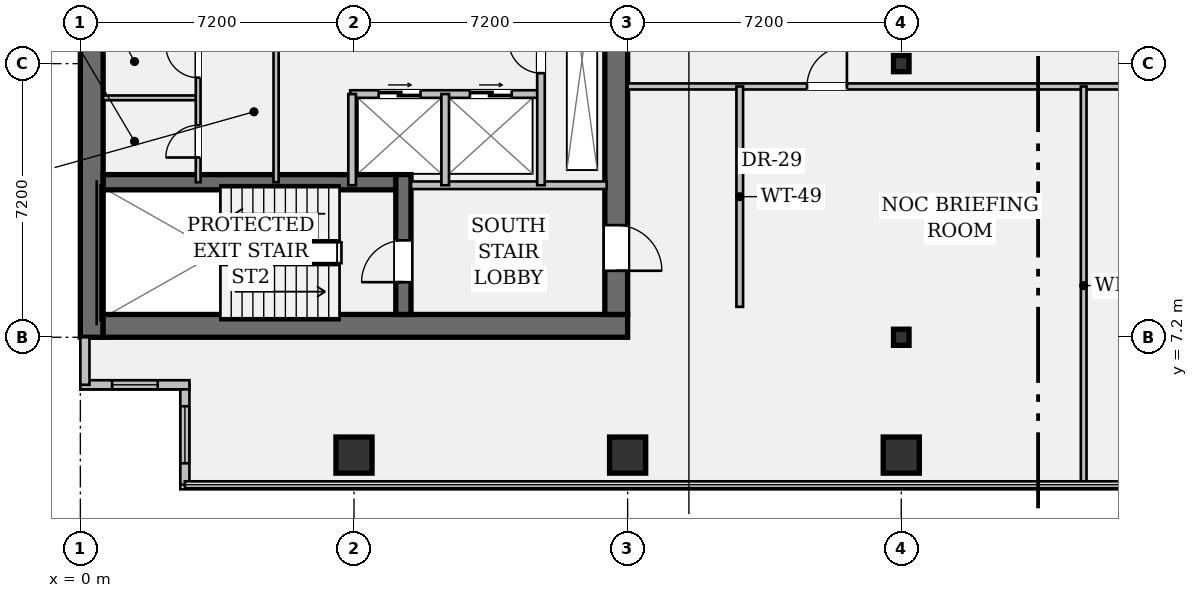
"""IFC4 building model, lengths in metres.
Left out: names, types, materials, properties, quantities, classifications, styles, units other than length and angle.
Written with IfcOpenShell. Run it as: python <this file> out.ifc"""

import sys

from ifc_helpers import new_model, si_unit, direction, frame, frame_2d, origin, origin_2d, place, context, subcontext, project, spatial, rectangle, hollow_rectangle, i_section, extrude, element, fill, save


model = new_model("IFC4")
c1 = context("Model", 3, precision=1e-05, world=origin(), true_north=direction((0.0, 1.0)))
c2 = subcontext(c1, "Body", "Model", "MODEL_VIEW")
j1 = project(units=[si_unit("LENGTHUNIT", "METRE"), si_unit("PLANEANGLEUNIT", "RADIAN")], contexts=[c1])
p1 = place(None, origin())
s1 = spatial("IfcSite", under=j1, at=p1, CompositionType="ELEMENT")
p2 = place(p1, origin())
s2 = spatial("IfcBuilding", under=s1, at=p2, CompositionType="ELEMENT")
p3 = place(p2, frame((0.0, 0.0, 97.65)))
s3 = spatial("IfcBuildingStorey", under=s2, at=p3, CompositionType="ELEMENT", Elevation=97.65)
p4 = place(p3, frame((0.3, 7.2, 0.0), z_axis=(0.0, 0.0, 1.0), x_axis=(0.0, 1.0, 0.0)))
e1 = element("IfcWall", 1, at=p4, inside=s3, PredefinedType="SHEAR", context=c2, shape_type="SweptSolid", body=[
    extrude(rectangle(XDim=28.8, YDim=0.6, at=frame_2d((14.4, 0.0))), origin(), (0.0, 0.0, 1.0), 4.28),
])
p5 = place(p3, frame((0.6, 7.5, 0.0), z_axis=(0.0, 0.0, 1.0), x_axis=(1.0, 0.0, 0.0)))
e2 = element("IfcWall", 2, at=p5, inside=s3, PredefinedType="SHEAR", context=c2, shape_type="SweptSolid", body=[
    extrude(rectangle(XDim=13.8, YDim=0.6, at=frame_2d((6.9, 0.0))), origin(), (0.0, 0.0, 1.0), 4.28),
])
p6 = place(p3, frame((14.1, 35.4, 0.0), z_axis=(0.0, 0.0, 1.0), x_axis=(0.0, -1.0, 0.0)))
e3 = element("IfcWall", 3, at=p6, inside=s3, PredefinedType="SHEAR", context=c2, shape_type="SweptSolid", body=[
    extrude(rectangle(XDim=27.6, YDim=0.6, at=frame_2d((13.8, 0.0))), origin(), (0.0, 0.0, 1.0), 4.28),
])
p7 = place(p6, frame((1.3, 0.0, 0.0)))
e4 = element("IfcOpeningElement", 4, at=p7, cuts=e3, PredefinedType="OPENING", context=c2, shape_type="SweptSolid", body=[
    extrude(rectangle(XDim=1.2, YDim=2.15, at=frame_2d((0.6, 1.075))), frame((0.0, 0.312, 0.0), z_axis=(0.0, -1.0, 0.0), x_axis=(1.0, 0.0, 0.0)), (0.0, 0.0, 1.0), 0.624),
])
p8 = place(p6, frame((25.25, 0.0, 0.0)))
e5 = element("IfcOpeningElement", 5, at=p8, cuts=e3, PredefinedType="OPENING", context=c2, shape_type="SweptSolid", body=[
    extrude(rectangle(XDim=1.2, YDim=2.15, at=frame_2d((0.6, 1.075))), frame((0.0, 0.312, 0.0), z_axis=(0.0, -1.0, 0.0), x_axis=(1.0, 0.0, 0.0)), (0.0, 0.0, 1.0), 0.624),
])
p9 = place(p6, frame((14.6, 0.0, 0.0)))
e6 = element("IfcOpeningElement", 6, at=p9, cuts=e3, PredefinedType="OPENING", context=c2, shape_type="SweptSolid", body=[
    extrude(rectangle(XDim=1.6, YDim=2.2, at=frame_2d((0.8, 1.1))), frame((0.0, 0.312, 0.0), z_axis=(0.0, -1.0, 0.0), x_axis=(1.0, 0.0, 0.0)), (0.0, 0.0, 1.0), 0.624),
])
p10 = place(p3, frame((0.6, 11.28, 0.0), z_axis=(0.0, 0.0, 1.0), x_axis=(1.0, 0.0, 0.0)))
e7 = element("IfcWall", 7, at=p10, inside=s3, PredefinedType="SHEAR", context=c2, shape_type="SweptSolid", body=[
    extrude(rectangle(XDim=7.7, YDim=0.4, at=frame_2d((3.85, 0.0))), origin(), (0.0, 0.0, 1.0), 4.28),
])
p11 = place(p3, frame((8.5, 7.8, 0.0), z_axis=(0.0, 0.0, 1.0), x_axis=(0.0, 1.0, 0.0)))
e8 = element("IfcWall", 8, at=p11, inside=s3, PredefinedType="SHEAR", context=c2, shape_type="SweptSolid", body=[
    extrude(rectangle(XDim=3.68, YDim=0.4, at=frame_2d((1.84, 0.0))), origin(), (0.0, 0.0, 1.0), 4.28),
])
p12 = place(p11, frame((0.85, 0.0, 0.0)))
e9 = element("IfcOpeningElement", 9, at=p12, cuts=e8, PredefinedType="OPENING", context=c2, shape_type="SweptSolid", body=[
    extrude(rectangle(XDim=1.1, YDim=2.15, at=frame_2d((0.55, 1.075))), frame((0.0, 0.212, 0.0), z_axis=(0.0, -1.0, 0.0), x_axis=(1.0, 0.0, 0.0)), (0.0, 0.0, 1.0), 0.424),
])
for number, where, z_axis, x_axis in (
    (10, (7.2, 4.1, 0.0), (0.0, 0.0, 1.0), (1.0, 0.0, 0.0)),
    (11, (14.4, 4.1, 0.0), (0.0, 0.0, 1.0), (1.0, 0.0, 0.0)),
    (12, (21.6, 4.1, 0.0), (0.0, 0.0, 1.0), (1.0, 0.0, 0.0)),
):
    element("IfcColumn", number, at=place(p3, frame(where, z_axis=z_axis, x_axis=x_axis)), inside=s3, PredefinedType="COLUMN", context=c2, shape_type="SweptSolid", body=[
        extrude(hollow_rectangle(XDim=0.95, YDim=0.95, WallThickness=0.06, at=origin_2d()), origin(), (0.0, 0.0, 1.0), 4.28),
    ])
for number, where, z_axis, x_axis in (
    (13, (21.6, 7.2, 0.0), (0.0, 0.0, 1.0), (1.0, 0.0, 0.0)),
    (14, (21.6, 14.4, 0.0), (0.0, 0.0, 1.0), (1.0, 0.0, 0.0)),
):
    element("IfcColumn", number, at=place(p3, frame(where, z_axis=z_axis, x_axis=x_axis)), inside=s3, PredefinedType="COLUMN", context=c2, shape_type="SweptSolid", body=[
        extrude(i_section(OverallWidth=0.409, OverallDepth=0.424, WebThickness=0.033, FlangeThickness=0.052, FilletRadius=0.018, at=origin_2d()), origin(), (0.0, 0.0, 1.0), 4.28),
    ])
p13 = place(p3, frame((2.75, 3.32, 0.0), z_axis=(0.0, 0.0, 1.0), x_axis=(0.0, 1.0, 0.0)))
e15 = element("IfcWall", 15, at=p13, inside=s3, PredefinedType="STANDARD", context=c2, shape_type="SweptSolid", body=[
    extrude(rectangle(XDim=2.63, YDim=0.24, at=frame_2d((1.315, 0.0))), origin(), (0.0, 0.0, 1.0), 4.28),
])
p14 = place(p13, frame((0.565, 0.0, 0.95)))
e16 = element("IfcOpeningElement", 16, at=p14, cuts=e15, PredefinedType="OPENING", context=c2, shape_type="SweptSolid", body=[
    extrude(rectangle(XDim=1.5, YDim=1.8, at=frame_2d((0.75, 0.9))), frame((0.0, 0.132, 0.0), z_axis=(0.0, -1.0, 0.0), x_axis=(1.0, 0.0, 0.0)), (0.0, 0.0, 1.0), 0.264),
])
p15 = place(p3, frame((2.87, 5.95, 0.0), z_axis=(0.0, 0.0, 1.0), x_axis=(-1.0, 0.0, 0.0)))
e17 = element("IfcWall", 17, at=p15, inside=s3, PredefinedType="STANDARD", context=c2, shape_type="SweptSolid", body=[
    extrude(rectangle(XDim=2.87, YDim=0.24, at=frame_2d((1.435, 0.0))), origin(), (0.0, 0.0, 1.0), 4.28),
])
p16 = place(p15, frame((0.835, 0.0, 0.95)))
e18 = element("IfcOpeningElement", 18, at=p16, cuts=e17, PredefinedType="OPENING", context=c2, shape_type="SweptSolid", body=[
    extrude(rectangle(XDim=1.2, YDim=1.8, at=frame_2d((0.6, 0.9))), frame((0.0, 0.132, 0.0), z_axis=(0.0, -1.0, 0.0), x_axis=(1.0, 0.0, 0.0)), (0.0, 0.0, 1.0), 0.264),
])
p17 = place(p3, frame((0.12, 5.95, 0.0), z_axis=(0.0, 0.0, 1.0), x_axis=(0.0, 1.0, 0.0)))
e19 = element("IfcWall", 19, at=p17, inside=s3, PredefinedType="STANDARD", context=c2, shape_type="SweptSolid", body=[
    extrude(rectangle(XDim=1.25, YDim=0.24, at=frame_2d((0.625, 0.0))), origin(), (0.0, 0.0, 1.0), 4.28),
])
p18 = place(p3, frame((8.7, 11.2, 0.0), z_axis=(0.0, 0.0, 1.0), x_axis=(1.0, 0.0, 0.0)))
e20 = element("IfcWall", 20, at=p18, inside=s3, PredefinedType="PARTITIONING", context=c2, shape_type="SweptSolid", body=[
    extrude(rectangle(XDim=5.15, YDim=0.2, at=frame_2d((2.575, 0.0))), origin(), (0.0, 0.0, 1.0), 4.28),
])
p19 = place(p3, frame((7.1, 13.6, 0.0), z_axis=(0.0, 0.0, 1.0), x_axis=(1.0, 0.0, 0.0)))
e21 = element("IfcWall", 21, at=p19, inside=s3, PredefinedType="PARTITIONING", context=c2, shape_type="SweptSolid", body=[
    extrude(rectangle(XDim=5.02, YDim=0.2, at=frame_2d((2.51, 0.0))), origin(), (0.0, 0.0, 1.0), 4.28),
])
p20 = place(p19, frame((0.75, 0.0, 0.0)))
e22 = element("IfcOpeningElement", 22, at=p20, cuts=e21, PredefinedType="OPENING", context=c2, shape_type="SweptSolid", body=[
    extrude(rectangle(XDim=1.1, YDim=2.2, at=frame_2d((0.55, 1.1))), frame((0.0, 0.112, 0.0), z_axis=(0.0, -1.0, 0.0), x_axis=(1.0, 0.0, 0.0)), (0.0, 0.0, 1.0), 0.224),
])
p21 = place(p19, frame((3.15, 0.0, 0.0)))
e23 = element("IfcOpeningElement", 23, at=p21, cuts=e21, PredefinedType="OPENING", context=c2, shape_type="SweptSolid", body=[
    extrude(rectangle(XDim=1.1, YDim=2.2, at=frame_2d((0.55, 1.1))), frame((0.0, 0.112, 0.0), z_axis=(0.0, -1.0, 0.0), x_axis=(1.0, 0.0, 0.0)), (0.0, 0.0, 1.0), 0.224),
])
for number, where, z_axis, x_axis in (
    (24, (7.15, 11.2, 0.0), (0.0, 0.0, 1.0), (0.0, 1.0, 0.0)),
    (25, (9.6, 11.2, 0.0), (0.0, 0.0, 1.0), (0.0, 1.0, 0.0)),
):
    element("IfcWall", number, at=place(p3, frame(where, z_axis=z_axis, x_axis=x_axis)), inside=s3, PredefinedType="PARTITIONING", context=c2, shape_type="SweptSolid", body=[
        extrude(rectangle(XDim=2.4, YDim=0.2, at=frame_2d((1.2, 0.0))), origin(), (0.0, 0.0, 1.0), 4.28),
    ])
p22 = place(p3, frame((12.12, 11.2, 0.0), z_axis=(0.0, 0.0, 1.0), x_axis=(0.0, 1.0, 0.0)))
e26 = element("IfcWall", 26, at=p22, inside=s3, PredefinedType="PARTITIONING", context=c2, shape_type="SweptSolid", body=[
    extrude(rectangle(XDim=6.6, YDim=0.2, at=frame_2d((3.3, 0.0))), origin(), (0.0, 0.0, 1.0), 4.28),
])
p23 = place(p22, frame((2.95, 0.0, 0.0)))
e27 = element("IfcOpeningElement", 27, at=p23, cuts=e26, PredefinedType="OPENING", context=c2, shape_type="SweptSolid", body=[
    extrude(rectangle(XDim=0.85, YDim=2.15, at=frame_2d((0.425, 1.075))), frame((0.0, 0.112, 0.0), z_axis=(0.0, -1.0, 0.0), x_axis=(1.0, 0.0, 0.0)), (0.0, 0.0, 1.0), 0.224),
])
p24 = place(p3, frame((5.15, 11.28, 0.0), z_axis=(0.0, 0.0, 1.0), x_axis=(0.0, 1.0, 0.0)))
e28 = element("IfcWall", 28, at=p24, inside=s3, PredefinedType="PARTITIONING", context=c2, shape_type="SweptSolid", body=[
    extrude(rectangle(XDim=4.42, YDim=0.135, at=frame_2d((2.21, 0.0))), origin(), (0.0, 0.0, 1.0), 4.28),
])
p25 = place(p3, frame((0.6, 13.5, 0.0), z_axis=(0.0, 0.0, 1.0), x_axis=(1.0, 0.0, 0.0)))
e29 = element("IfcWall", 29, at=p25, inside=s3, PredefinedType="PARTITIONING", context=c2, shape_type="SweptSolid", body=[
    extrude(rectangle(XDim=2.5, YDim=0.125, at=frame_2d((1.25, 0.0))), origin(), (0.0, 0.0, 1.0), 4.28),
])
p26 = place(p3, frame((3.1, 11.28, 0.0), z_axis=(0.0, 0.0, 1.0), x_axis=(0.0, 1.0, 0.0)))
e30 = element("IfcWall", 30, at=p26, inside=s3, PredefinedType="PARTITIONING", context=c2, shape_type="SweptSolid", body=[
    extrude(rectangle(XDim=4.42, YDim=0.125, at=frame_2d((2.21, 0.0))), origin(), (0.0, 0.0, 1.0), 4.28),
])
p27 = place(p26, frame((0.65, 0.0, 0.0)))
e31 = element("IfcOpeningElement", 31, at=p27, cuts=e30, PredefinedType="OPENING", context=c2, shape_type="SweptSolid", body=[
    extrude(rectangle(XDim=0.85, YDim=2.15, at=frame_2d((0.425, 1.075))), frame((0.0, 0.074, 0.0), z_axis=(0.0, -1.0, 0.0), x_axis=(1.0, 0.0, 0.0)), (0.0, 0.0, 1.0), 0.149),
])
p28 = place(p26, frame((2.75, 0.0, 0.0)))
e32 = element("IfcOpeningElement", 32, at=p28, cuts=e30, PredefinedType="OPENING", context=c2, shape_type="SweptSolid", body=[
    extrude(rectangle(XDim=0.85, YDim=2.15, at=frame_2d((0.425, 1.075))), frame((0.0, 0.074, 0.0), z_axis=(0.0, -1.0, 0.0), x_axis=(1.0, 0.0, 0.0)), (0.0, 0.0, 1.0), 0.149),
])
p29 = place(p3, frame((14.4, 13.8, 0.0), z_axis=(0.0, 0.0, 1.0), x_axis=(1.0, 0.0, 0.0)))
e33 = element("IfcWall", 33, at=p29, inside=s3, PredefinedType="PARTITIONING", context=c2, shape_type="SweptSolid", body=[
    extrude(rectangle(XDim=32.68, YDim=0.16, at=frame_2d((16.34, 0.0))), origin(), (0.0, 0.0, 1.0), 3.493),
])
p30 = place(p29, frame((4.72, 0.0, 0.0)))
e34 = element("IfcOpeningElement", 34, at=p30, cuts=e33, PredefinedType="OPENING", context=c2, shape_type="SweptSolid", body=[
    extrude(rectangle(XDim=1.05, YDim=2.15, at=frame_2d((0.525, 1.075))), frame((0.0, 0.092, 0.0), z_axis=(0.0, -1.0, 0.0), x_axis=(1.0, 0.0, 0.0)), (0.0, 0.0, 1.0), 0.184),
])
p31 = place(p29, frame((13.0, 0.0, 0.0)))
e35 = element("IfcOpeningElement", 35, at=p31, cuts=e33, PredefinedType="OPENING", context=c2, shape_type="SweptSolid", body=[
    extrude(rectangle(XDim=0.98, YDim=2.15, at=frame_2d((0.49, 1.075))), frame((0.0, 0.092, 0.0), z_axis=(0.0, -1.0, 0.0), x_axis=(1.0, 0.0, 0.0)), (0.0, 0.0, 1.0), 0.184),
])
p32 = place(p3, frame((26.4, 3.32, 0.0), z_axis=(0.0, 0.0, 1.0), x_axis=(0.0, 1.0, 0.0)))
e36 = element("IfcWall", 36, at=p32, inside=s3, PredefinedType="PARTITIONING", context=c2, shape_type="SweptSolid", body=[
    extrude(rectangle(XDim=10.48, YDim=0.15, at=frame_2d((5.24, 0.0))), origin(), (0.0, 0.0, 1.0), 3.493),
])
p33 = place(p3, frame((17.35, 8.0, 0.0), z_axis=(0.0, 0.0, 1.0), x_axis=(0.0, 1.0, 0.0)))
e37 = element("IfcWall", 37, at=p33, inside=s3, PredefinedType="PARTITIONING", context=c2, shape_type="SweptSolid", body=[
    extrude(rectangle(XDim=5.8, YDim=0.175, at=frame_2d((2.9, 0.0))), origin(), (0.0, 0.0, 1.0), 4.28),
])
p34 = place(p14, origin())
e38 = element("IfcWindow", 38, at=p34, inside=s3, PartitioningType="SINGLE_PANEL", PredefinedType="WINDOW", context=c2, shape_type="SweptSolid", body=[
    extrude(rectangle(XDim=1.5, YDim=1.8, at=frame_2d((0.75, 0.9))), frame((0.0, 0.03, 0.0), z_axis=(0.0, -1.0, 0.0), x_axis=(1.0, 0.0, 0.0)), (0.0, 0.0, 1.0), 0.06),
])
fill(e16, e38)
p35 = place(p16, origin())
e39 = element("IfcWindow", 39, at=p35, inside=s3, PartitioningType="SINGLE_PANEL", PredefinedType="WINDOW", context=c2, shape_type="SweptSolid", body=[
    extrude(rectangle(XDim=1.2, YDim=1.8, at=frame_2d((0.6, 0.9))), frame((0.0, 0.03, 0.0), z_axis=(0.0, -1.0, 0.0), x_axis=(1.0, 0.0, 0.0)), (0.0, 0.0, 1.0), 0.06),
])
fill(e18, e39)
p36 = place(p12, origin())
e40 = element("IfcDoor", 40, at=p36, inside=s3, OperationType="SINGLE_SWING_LEFT", PredefinedType="DOOR", context=c2, shape_type="SweptSolid", body=[
    extrude(rectangle(XDim=1.1, YDim=2.15, at=frame_2d((0.55, 1.075))), frame((0.0, 0.025, 0.0), z_axis=(0.0, -1.0, 0.0), x_axis=(1.0, 0.0, 0.0)), (0.0, 0.0, 1.0), 0.05),
])
fill(e9, e40)
p37 = place(p8, origin())
e41 = element("IfcDoor", 41, at=p37, inside=s3, OperationType="SINGLE_SWING_RIGHT", PredefinedType="DOOR", context=c2, shape_type="SweptSolid", body=[
    extrude(rectangle(XDim=1.2, YDim=2.15, at=frame_2d((0.6, 1.075))), frame((0.0, 0.025, 0.0), z_axis=(0.0, -1.0, 0.0), x_axis=(1.0, 0.0, 0.0)), (0.0, 0.0, 1.0), 0.05),
])
fill(e5, e41)
p38 = place(p23, origin())
e42 = element("IfcDoor", 42, at=p38, inside=s3, OperationType="SINGLE_SWING_RIGHT", PredefinedType="DOOR", context=c2, shape_type="SweptSolid", body=[
    extrude(rectangle(XDim=0.85, YDim=2.15, at=frame_2d((0.425, 1.075))), frame((0.0, 0.025, 0.0), z_axis=(0.0, -1.0, 0.0), x_axis=(1.0, 0.0, 0.0)), (0.0, 0.0, 1.0), 0.05),
])
fill(e27, e42)
p39 = place(p20, origin())
e43 = element("IfcDoor", 43, at=p39, inside=s3, OperationType="DOUBLE_DOOR_SLIDING", PredefinedType="DOOR", context=c2, shape_type="SweptSolid", body=[
    extrude(rectangle(XDim=1.1, YDim=2.2, at=frame_2d((0.55, 1.1))), frame((0.0, 0.025, 0.0), z_axis=(0.0, -1.0, 0.0), x_axis=(1.0, 0.0, 0.0)), (0.0, 0.0, 1.0), 0.05),
])
fill(e22, e43)
p40 = place(p21, origin())
e44 = element("IfcDoor", 44, at=p40, inside=s3, OperationType="DOUBLE_DOOR_SLIDING", PredefinedType="DOOR", context=c2, shape_type="SweptSolid", body=[
    extrude(rectangle(XDim=1.1, YDim=2.2, at=frame_2d((0.55, 1.1))), frame((0.0, 0.025, 0.0), z_axis=(0.0, -1.0, 0.0), x_axis=(1.0, 0.0, 0.0)), (0.0, 0.0, 1.0), 0.05),
])
fill(e23, e44)
p41 = place(p27, origin())
e45 = element("IfcDoor", 45, at=p41, inside=s3, OperationType="SINGLE_SWING_LEFT", PredefinedType="DOOR", context=c2, shape_type="SweptSolid", body=[
    extrude(rectangle(XDim=0.85, YDim=2.15, at=frame_2d((0.425, 1.075))), frame((0.0, 0.025, 0.0), z_axis=(0.0, -1.0, 0.0), x_axis=(1.0, 0.0, 0.0)), (0.0, 0.0, 1.0), 0.05),
])
fill(e31, e45)
p42 = place(p28, origin())
e46 = element("IfcDoor", 46, at=p42, inside=s3, OperationType="SINGLE_SWING_RIGHT", PredefinedType="DOOR", context=c2, shape_type="SweptSolid", body=[
    extrude(rectangle(XDim=0.85, YDim=2.15, at=frame_2d((0.425, 1.075))), frame((0.0, 0.025, 0.0), z_axis=(0.0, -1.0, 0.0), x_axis=(1.0, 0.0, 0.0)), (0.0, 0.0, 1.0), 0.05),
])
fill(e32, e46)
p43 = place(p30, origin())
e47 = element("IfcDoor", 47, at=p43, inside=s3, OperationType="SINGLE_SWING_RIGHT", PredefinedType="DOOR", context=c2, shape_type="SweptSolid", body=[
    extrude(rectangle(XDim=1.05, YDim=2.15, at=frame_2d((0.525, 1.075))), frame((0.0, 0.025, 0.0), z_axis=(0.0, -1.0, 0.0), x_axis=(1.0, 0.0, 0.0)), (0.0, 0.0, 1.0), 0.05),
])
fill(e34, e47)
save(model, sys.argv[1])
